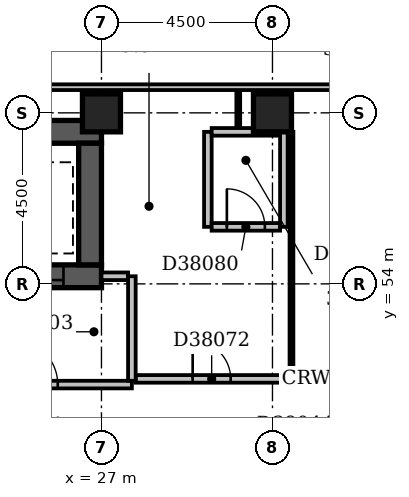
"""IFC4 building model, lengths in metres.
Left out: names, types, materials, properties, quantities, classifications, styles, units other than length and angle.
Written with IfcOpenShell. Run it as: python <this file> out.ifc"""

import sys

from ifc_helpers import new_model, si_unit, direction, frame, frame_2d, origin, origin_2d, place, context, subcontext, project, spatial, rectangle, extrude, element, fill, save


model = new_model("IFC4")
c1 = context("Model", 3, precision=1e-05, world=origin(), true_north=direction((0.0, 1.0)))
c2 = subcontext(c1, "Body", "Model", "MODEL_VIEW")
j1 = project(units=[si_unit("LENGTHUNIT", "METRE"), si_unit("PLANEANGLEUNIT", "RADIAN")], contexts=[c1])
p1 = place(None, origin())
s1 = spatial("IfcSite", under=j1, at=p1, CompositionType="ELEMENT")
p2 = place(p1, origin())
s2 = spatial("IfcBuilding", under=s1, at=p2, CompositionType="ELEMENT")
p3 = place(p2, frame((0.0, 0.0, 152.0)))
s3 = spatial("IfcBuildingStorey", under=s2, at=p3, CompositionType="ELEMENT", Elevation=152.0)
p4 = place(p3, frame((23.9, 54.2, -0.3), z_axis=(0.0, 0.0, 1.0), x_axis=(1.0, 0.0, 0.0)))
e1 = element("IfcWall", 1, at=p4, inside=s3, PredefinedType="SHEAR", context=c2, shape_type="SweptSolid", body=[
    extrude(rectangle(XDim=3.1, YDim=0.6, at=frame_2d((1.55, 0.0))), origin(), (0.0, 0.0, 1.0), 3.6),
])
p5 = place(p4, frame((1.0, 0.0, 0.3)))
e2 = element("IfcOpeningElement", 2, at=p5, cuts=e1, PredefinedType="OPENING", context=c2, shape_type="SweptSolid", body=[
    extrude(rectangle(XDim=1.1, YDim=2.1, at=frame_2d((0.55, 1.05))), frame((0.0, 0.312, 0.0), z_axis=(0.0, -1.0, 0.0), x_axis=(1.0, 0.0, 0.0)), (0.0, 0.0, 1.0), 0.624),
])
p6 = place(p3, frame((23.9, 58.0, -0.3), z_axis=(0.0, 0.0, 1.0), x_axis=(1.0, 0.0, 0.0)))
e3 = element("IfcWall", 3, at=p6, inside=s3, PredefinedType="SHEAR", context=c2, shape_type="SweptSolid", body=[
    extrude(rectangle(XDim=3.1, YDim=0.6, at=frame_2d((1.55, 0.0))), origin(), (0.0, 0.0, 1.0), 3.6),
])
p7 = place(p3, frame((26.7, 54.5, -0.3), z_axis=(0.0, 0.0, 1.0), x_axis=(0.0, 1.0, 0.0)))
e4 = element("IfcWall", 4, at=p7, inside=s3, PredefinedType="SHEAR", context=c2, shape_type="SweptSolid", body=[
    extrude(rectangle(XDim=3.2, YDim=0.6, at=frame_2d((1.6, 0.0))), origin(), (0.0, 0.0, 1.0), 3.6),
])
for number, where, z_axis, x_axis in (
    (5, (27.0, 58.5, -0.3), (0.0, 0.0, 1.0), (1.0, 0.0, 0.0)),
    (6, (31.5, 58.5, -0.3), (0.0, 0.0, 1.0), (1.0, 0.0, 0.0)),
):
    element("IfcColumn", number, at=place(p3, frame(where, z_axis=z_axis, x_axis=x_axis)), inside=s3, PredefinedType="COLUMN", context=c2, shape_type="SweptSolid", body=[
        extrude(rectangle(XDim=1.0, YDim=1.0, at=origin_2d()), origin(), (0.0, 0.0, 1.0), 3.6),
    ])
p8 = place(p3, frame((68.1, 59.175, 0.0), z_axis=(0.0, 0.0, 1.0), x_axis=(-1.0, 0.0, 0.0)))
e7 = element("IfcWall", 7, at=p8, inside=s3, PredefinedType="STANDARD", context=c2, shape_type="SweptSolid", body=[
    extrude(rectangle(XDim=68.85, YDim=0.15, at=frame_2d((34.425, 0.0))), origin(), (0.0, 0.0, 1.0), 2.7),
])
p9 = place(p8, frame((1.65, 0.0, 0.6)))
e8 = element("IfcOpeningElement", 8, at=p9, cuts=e7, PredefinedType="OPENING", context=c2, shape_type="SweptSolid", body=[
    extrude(rectangle(XDim=2.4, YDim=1.8, at=frame_2d((1.2, 0.9))), frame((0.0, 0.087, 0.0), z_axis=(0.0, -1.0, 0.0), x_axis=(1.0, 0.0, 0.0)), (0.0, 0.0, 1.0), 0.174),
])
p10 = place(p8, frame((5.86, 0.0, 0.6)))
e9 = element("IfcOpeningElement", 9, at=p10, cuts=e7, PredefinedType="OPENING", context=c2, shape_type="SweptSolid", body=[
    extrude(rectangle(XDim=1.8, YDim=1.8, at=frame_2d((0.9, 0.9))), frame((0.0, 0.087, 0.0), z_axis=(0.0, -1.0, 0.0), x_axis=(1.0, 0.0, 0.0)), (0.0, 0.0, 1.0), 0.174),
])
p11 = place(p8, frame((15.15, 0.0, 0.6)))
e10 = element("IfcOpeningElement", 10, at=p11, cuts=e7, PredefinedType="OPENING", context=c2, shape_type="SweptSolid", body=[
    extrude(rectangle(XDim=2.4, YDim=1.8, at=frame_2d((1.2, 0.9))), frame((0.0, 0.087, 0.0), z_axis=(0.0, -1.0, 0.0), x_axis=(1.0, 0.0, 0.0)), (0.0, 0.0, 1.0), 0.174),
])
p12 = place(p3, frame((23.0, 51.35, 0.0), z_axis=(0.0, 0.0, 1.0), x_axis=(1.0, 0.0, 0.0)))
e11 = element("IfcWall", 11, at=p12, inside=s3, PredefinedType="PARTITIONING", context=c2, shape_type="SweptSolid", body=[
    extrude(rectangle(XDim=4.8, YDim=0.2, at=frame_2d((2.4, 0.0))), origin(), (0.0, 0.0, 1.0), 3.3),
])
p13 = place(p12, frame((1.65, 0.0, 0.0)))
e12 = element("IfcOpeningElement", 12, at=p13, cuts=e11, PredefinedType="OPENING", context=c2, shape_type="SweptSolid", body=[
    extrude(rectangle(XDim=1.2, YDim=2.1, at=frame_2d((0.6, 1.05))), frame((0.0, 0.112, 0.0), z_axis=(0.0, -1.0, 0.0), x_axis=(1.0, 0.0, 0.0)), (0.0, 0.0, 1.0), 0.224),
])
p14 = place(p3, frame((27.8, 51.45, 0.0), z_axis=(0.0, 0.0, 1.0), x_axis=(0.0, 1.0, 0.0)))
e13 = element("IfcWall", 13, at=p14, inside=s3, PredefinedType="PARTITIONING", context=c2, shape_type="SweptSolid", body=[
    extrude(rectangle(XDim=2.75, YDim=0.2, at=frame_2d((1.375, 0.0))), origin(), (0.0, 0.0, 1.0), 3.3),
])
p15 = place(p3, frame((27.0, 54.2, 0.0), z_axis=(0.0, 0.0, 1.0), x_axis=(1.0, 0.0, 0.0)))
e14 = element("IfcWall", 14, at=p15, inside=s3, PredefinedType="PARTITIONING", context=c2, shape_type="SweptSolid", body=[
    extrude(rectangle(XDim=0.7, YDim=0.2, at=frame_2d((0.35, 0.0))), origin(), (0.0, 0.0, 1.0), 3.3),
])
p16 = place(p3, frame((27.9, 51.5, 0.0), z_axis=(0.0, 0.0, 1.0), x_axis=(1.0, 0.0, 0.0)))
e15 = element("IfcWall", 15, at=p16, inside=s3, PredefinedType="PARTITIONING", context=c2, shape_type="SweptSolid", body=[
    extrude(rectangle(XDim=9.3, YDim=0.2, at=frame_2d((4.65, 0.0))), origin(), (0.0, 0.0, 1.0), 3.3),
])
p17 = place(p16, frame((1.5, 0.0, 0.0)))
e16 = element("IfcOpeningElement", 16, at=p17, cuts=e15, PredefinedType="OPENING", context=c2, shape_type="SweptSolid", body=[
    extrude(rectangle(XDim=1.0, YDim=2.1, at=frame_2d((0.5, 1.05))), frame((0.0, 0.112, 0.0), z_axis=(0.0, -1.0, 0.0), x_axis=(1.0, 0.0, 0.0)), (0.0, 0.0, 1.0), 0.224),
])
p18 = place(p16, frame((6.3, 0.0, 0.0)))
e17 = element("IfcOpeningElement", 17, at=p18, cuts=e15, PredefinedType="OPENING", context=c2, shape_type="SweptSolid", body=[
    extrude(rectangle(XDim=0.9, YDim=2.1, at=frame_2d((0.45, 1.05))), frame((0.0, 0.112, 0.0), z_axis=(0.0, -1.0, 0.0), x_axis=(1.0, 0.0, 0.0)), (0.0, 0.0, 1.0), 0.224),
])
p19 = place(p3, frame((32.0, 51.6, 0.0), z_axis=(0.0, 0.0, 1.0), x_axis=(0.0, 1.0, 0.0)))
e18 = element("IfcWall", 18, at=p19, inside=s3, PredefinedType="PARTITIONING", context=c2, shape_type="SweptSolid", body=[
    extrude(rectangle(XDim=6.4, YDim=0.1, at=frame_2d((3.2, 0.0))), origin(), (0.0, 0.0, 1.0), 3.3),
])
p20 = place(p3, frame((29.8, 55.5, 0.0), z_axis=(0.0, 0.0, 1.0), x_axis=(0.0, 1.0, 0.0)))
e19 = element("IfcWall", 19, at=p20, inside=s3, PredefinedType="PARTITIONING", context=c2, shape_type="SweptSolid", body=[
    extrude(rectangle(XDim=2.5, YDim=0.2, at=frame_2d((1.25, 0.0))), origin(), (0.0, 0.0, 1.0), 3.3),
])
p21 = place(p3, frame((29.9, 55.5, 0.0), z_axis=(0.0, 0.0, 1.0), x_axis=(1.0, 0.0, 0.0)))
e20 = element("IfcWall", 20, at=p21, inside=s3, PredefinedType="PARTITIONING", context=c2, shape_type="SweptSolid", body=[
    extrude(rectangle(XDim=1.8, YDim=0.2, at=frame_2d((0.9, 0.0))), origin(), (0.0, 0.0, 1.0), 3.3),
])
p22 = place(p21, frame((0.4, 0.0, 0.0)))
e21 = element("IfcOpeningElement", 21, at=p22, cuts=e20, PredefinedType="OPENING", context=c2, shape_type="SweptSolid", body=[
    extrude(rectangle(XDim=1.0, YDim=2.1, at=frame_2d((0.5, 1.05))), frame((0.0, 0.112, 0.0), z_axis=(0.0, -1.0, 0.0), x_axis=(1.0, 0.0, 0.0)), (0.0, 0.0, 1.0), 0.224),
])
p23 = place(p3, frame((31.8, 55.5, 0.0), z_axis=(0.0, 0.0, 1.0), x_axis=(0.0, 1.0, 0.0)))
e22 = element("IfcWall", 22, at=p23, inside=s3, PredefinedType="PARTITIONING", context=c2, shape_type="SweptSolid", body=[
    extrude(rectangle(XDim=2.5, YDim=0.2, at=frame_2d((1.25, 0.0))), origin(), (0.0, 0.0, 1.0), 3.3),
])
p24 = place(p3, frame((29.9, 58.0, 0.0), z_axis=(0.0, 0.0, 1.0), x_axis=(1.0, 0.0, 0.0)))
e23 = element("IfcWall", 23, at=p24, inside=s3, PredefinedType="PARTITIONING", context=c2, shape_type="SweptSolid", body=[
    extrude(rectangle(XDim=1.8, YDim=0.2, at=frame_2d((0.9, 0.0))), origin(), (0.0, 0.0, 1.0), 3.3),
])
p25 = place(p3, frame((30.6, 58.1, 0.0), z_axis=(0.0, 0.0, 1.0), x_axis=(0.0, 1.0, 0.0)))
e24 = element("IfcWall", 24, at=p25, inside=s3, PredefinedType="PARTITIONING", context=c2, shape_type="SweptSolid", body=[
    extrude(rectangle(XDim=1.0, YDim=0.1, at=frame_2d((0.5, 0.0))), origin(), (0.0, 0.0, 1.0), 3.3),
])
p26 = place(p13, origin())
e25 = element("IfcDoor", 25, at=p26, inside=s3, OperationType="SINGLE_SWING_LEFT", PredefinedType="DOOR", context=c2, shape_type="SweptSolid", body=[
    extrude(rectangle(XDim=1.2, YDim=2.1, at=frame_2d((0.6, 1.05))), frame((0.0, 0.025, 0.0), z_axis=(0.0, -1.0, 0.0), x_axis=(1.0, 0.0, 0.0)), (0.0, 0.0, 1.0), 0.05),
])
fill(e12, e25)
p27 = place(p5, origin())
e26 = element("IfcDoor", 26, at=p27, inside=s3, OperationType="SLIDING_TO_LEFT", PredefinedType="DOOR", context=c2, shape_type="SweptSolid", body=[
    extrude(rectangle(XDim=1.1, YDim=2.1, at=frame_2d((0.55, 1.05))), frame((0.0, 0.025, 0.0), z_axis=(0.0, -1.0, 0.0), x_axis=(1.0, 0.0, 0.0)), (0.0, 0.0, 1.0), 0.05),
])
fill(e2, e26)
p28 = place(p17, origin())
e27 = element("IfcDoor", 27, at=p28, inside=s3, OperationType="SINGLE_SWING_LEFT", PredefinedType="DOOR", context=c2, shape_type="SweptSolid", body=[
    extrude(rectangle(XDim=1.0, YDim=2.1, at=frame_2d((0.5, 1.05))), frame((0.0, 0.025, 0.0), z_axis=(0.0, -1.0, 0.0), x_axis=(1.0, 0.0, 0.0)), (0.0, 0.0, 1.0), 0.05),
])
fill(e16, e27)
p29 = place(p22, origin())
e28 = element("IfcDoor", 28, at=p29, inside=s3, OperationType="SINGLE_SWING_LEFT", PredefinedType="DOOR", context=c2, shape_type="SweptSolid", body=[
    extrude(rectangle(XDim=1.0, YDim=2.1, at=frame_2d((0.5, 1.05))), frame((0.0, 0.025, 0.0), z_axis=(0.0, -1.0, 0.0), x_axis=(1.0, 0.0, 0.0)), (0.0, 0.0, 1.0), 0.05),
])
fill(e21, e28)
save(model, sys.argv[1])
